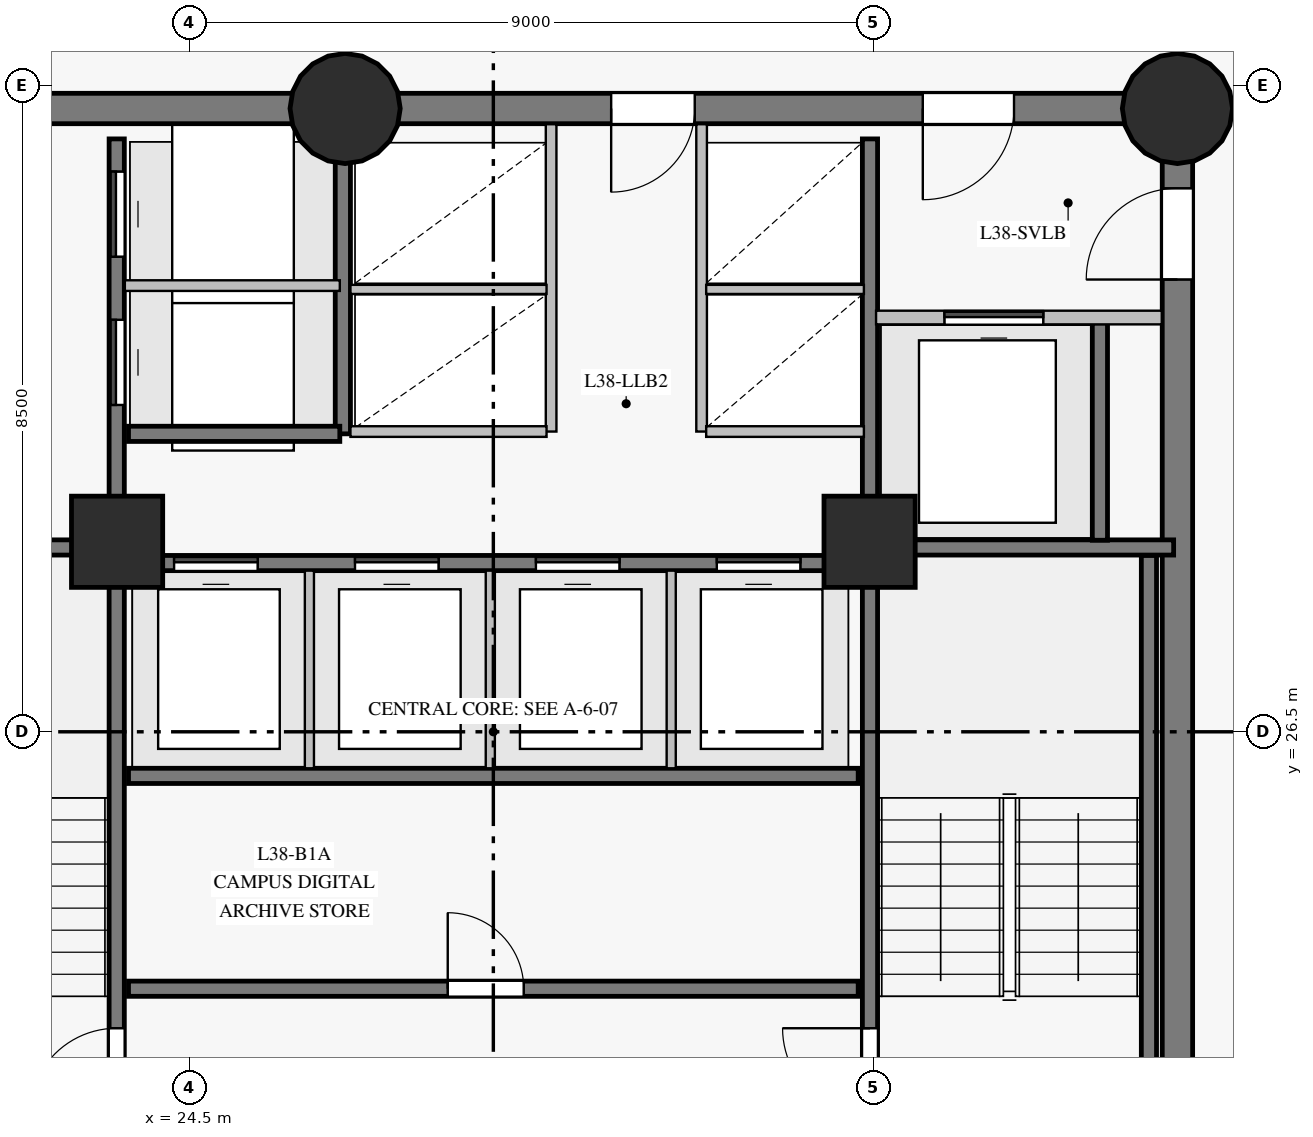
"""IFC4 building model, lengths in metres.
Left out: names, types, materials, properties, quantities, classifications, styles, units other than length and angle.
Written with IfcOpenShell. Run it as: python <this file> out.ifc"""

import sys

from ifc_helpers import new_model, si_unit, direction, frame, frame_2d, origin, origin_with_axes, origin_2d, place, context, subcontext, project, spatial, rectangle, circle, extrude, source, transform, mapped, element, fill, save


model = new_model("IFC4")
c1 = context("Model", 3, precision=1e-05, world=origin(), true_north=direction((0.0, 1.0)))
c2 = subcontext(c1, "Body", "Model", "MODEL_VIEW")
j1 = project(units=[si_unit("LENGTHUNIT", "METRE"), si_unit("PLANEANGLEUNIT", "RADIAN")], contexts=[c1])
p1 = place(None, origin())
s1 = spatial("IfcSite", under=j1, at=p1, CompositionType="ELEMENT")
p2 = place(p1, origin())
s2 = spatial("IfcBuilding", under=s1, at=p2, CompositionType="ELEMENT")
p3 = place(p2, frame((0.0, 0.0, 135.85)))
s3 = spatial("IfcBuildingStorey", under=s2, at=p3, CompositionType="ELEMENT", Elevation=135.85)
p4 = place(p3, frame((37.5, 18.3, 0.0), z_axis=(0.0, 0.0, 1.0), x_axis=(0.0, 1.0, 0.0)))
e1 = element("IfcWall", 1, at=p4, inside=s3, PredefinedType="SHEAR", context=c2, shape_type="SweptSolid", body=[
    extrude(rectangle(XDim=16.4, YDim=0.4, at=frame_2d((8.2, 0.0))), origin(), (0.0, 0.0, 1.0), 2.825),
])
p5 = place(p4, frame((14.15, 0.0, 0.0)))
e2 = element("IfcOpeningElement", 2, at=p5, cuts=e1, PredefinedType="OPENING", context=c2, shape_type="SweptSolid", body=[
    extrude(rectangle(XDim=1.2, YDim=2.15, at=frame_2d((0.6, 1.075))), frame((0.0, 0.21, 0.0), z_axis=(0.0, -1.0, 0.0), x_axis=(1.0, 0.0, 0.0)), (0.0, 0.0, 1.0), 0.42),
])
p6 = place(p3, frame((37.5, 34.7, 0.0), z_axis=(0.0, 0.0, 1.0), x_axis=(-1.0, 0.0, 0.0)))
e3 = element("IfcWall", 3, at=p6, inside=s3, PredefinedType="SHEAR", context=c2, shape_type="SweptSolid", body=[
    extrude(rectangle(XDim=10.95, YDim=0.4, at=frame_2d((5.475, 0.0))), origin(), (0.0, 0.0, 1.0), 2.825),
])
p7 = place(p6, frame((2.15, 0.0, 0.0)))
e4 = element("IfcOpeningElement", 4, at=p7, cuts=e3, PredefinedType="OPENING", context=c2, shape_type="SweptSolid", body=[
    extrude(rectangle(XDim=1.2, YDim=2.15, at=frame_2d((0.6, 1.075))), frame((0.0, 0.21, 0.0), z_axis=(0.0, -1.0, 0.0), x_axis=(1.0, 0.0, 0.0)), (0.0, 0.0, 1.0), 0.42),
])
p8 = place(p6, frame((6.35, 0.0, 0.0)))
e5 = element("IfcOpeningElement", 5, at=p8, cuts=e3, PredefinedType="OPENING", context=c2, shape_type="SweptSolid", body=[
    extrude(rectangle(XDim=1.1, YDim=2.15, at=frame_2d((0.55, 1.075))), frame((0.0, 0.21, 0.0), z_axis=(0.0, -1.0, 0.0), x_axis=(1.0, 0.0, 0.0)), (0.0, 0.0, 1.0), 0.42),
])
p9 = place(p3, frame((26.55, 34.7, 0.0), z_axis=(0.0, 0.0, 1.0), x_axis=(-1.0, 0.0, 0.0)))
e6 = element("IfcWall", 6, at=p9, inside=s3, PredefinedType="SHEAR", context=c2, shape_type="SweptSolid", body=[
    extrude(rectangle(XDim=7.05, YDim=0.4, at=frame_2d((3.525, 0.0))), origin(), (0.0, 0.0, 1.0), 2.825),
])
p10 = place(p9, frame((4.25, 0.0, 0.0)))
e7 = element("IfcOpeningElement", 7, at=p10, cuts=e6, PredefinedType="OPENING", context=c2, shape_type="SweptSolid", body=[
    extrude(rectangle(XDim=1.1, YDim=2.15, at=frame_2d((0.55, 1.075))), frame((0.0, 0.21, 0.0), z_axis=(0.0, -1.0, 0.0), x_axis=(1.0, 0.0, 0.0)), (0.0, 0.0, 1.0), 0.42),
])
m1 = source(origin_with_axes(), c2, "Body", "SweptSolid", [
    extrude(circle(Radius=0.725, at=origin_2d()), origin(), (0.0, 0.0, 1.0), 3.05),
])
for number, where, z_axis, x_axis in (
    (8, (26.55, 34.7, 0.0), (0.0, 0.0, 1.0), (1.0, 0.0, 0.0)),
    (9, (37.5, 34.7, 0.0), (0.0, 0.0, 1.0), (1.0, 0.0, 0.0)),
):
    element("IfcColumn", number, at=place(p3, frame(where, z_axis=z_axis, x_axis=x_axis)), inside=s3, PredefinedType="COLUMN", context=c2, shape_type="MappedRepresentation", body=[
        mapped(m1, transform((0.0, 0.0, 0.0), scale=1.0)),
    ])
m2 = source(origin_with_axes(), c2, "Body", "SweptSolid", [
    extrude(rectangle(XDim=1.2, YDim=1.2, at=origin_2d()), origin(), (0.0, 0.0, 1.0), 3.05),
])
for number, where, z_axis, x_axis in (
    (10, (23.55, 29.0, 0.0), (0.0, 0.0, 1.0), (1.0, 0.0, 0.0)),
    (11, (33.45, 29.0, 0.0), (0.0, 0.0, 1.0), (1.0, 0.0, 0.0)),
):
    element("IfcColumn", number, at=place(p3, frame(where, z_axis=z_axis, x_axis=x_axis)), inside=s3, PredefinedType="COLUMN", context=c2, shape_type="MappedRepresentation", body=[
        mapped(m2, transform((0.0, 0.0, 0.0), scale=1.0)),
    ])
p11 = place(p3, frame((23.545, 18.7, 0.0), z_axis=(0.0, 0.0, 1.0), x_axis=(0.0, 1.0, 0.0)))
e12 = element("IfcWall", 12, at=p11, inside=s3, PredefinedType="SHEAR", context=c2, shape_type="SweptSolid", body=[
    extrude(rectangle(XDim=15.6, YDim=0.2, at=frame_2d((7.8, 0.0))), origin(), (0.0, 0.0, 1.0), 2.825),
])
p12 = place(p11, frame((2.75, 0.0, 0.0)))
e13 = element("IfcOpeningElement", 13, at=p12, cuts=e12, PredefinedType="OPENING", context=c2, shape_type="SweptSolid", body=[
    extrude(rectangle(XDim=1.15, YDim=2.15, at=frame_2d((0.575, 1.075))), frame((0.0, 0.11, 0.0), z_axis=(0.0, -1.0, 0.0), x_axis=(1.0, 0.0, 0.0)), (0.0, 0.0, 1.0), 0.22),
])
p13 = place(p11, frame((0.14, 0.0, 0.0)))
e14 = element("IfcOpeningElement", 14, at=p13, cuts=e12, PredefinedType="OPENING", context=c2, shape_type="SweptSolid", body=[
    extrude(rectangle(XDim=0.88, YDim=2.1, at=frame_2d((0.44, 1.05))), frame((0.0, 0.11, 0.0), z_axis=(0.0, -1.0, 0.0), x_axis=(1.0, 0.0, 0.0)), (0.0, 0.0, 1.0), 0.22),
])
p14 = place(p11, frame((1.36, 0.0, 0.0)))
e15 = element("IfcOpeningElement", 15, at=p14, cuts=e12, PredefinedType="OPENING", context=c2, shape_type="SweptSolid", body=[
    extrude(rectangle(XDim=0.88, YDim=2.1, at=frame_2d((0.44, 1.05))), frame((0.0, 0.11, 0.0), z_axis=(0.0, -1.0, 0.0), x_axis=(1.0, 0.0, 0.0)), (0.0, 0.0, 1.0), 0.22),
])
p15 = place(p11, frame((12.1, 0.0, 0.0)))
e16 = element("IfcOpeningElement", 16, at=p15, cuts=e12, PredefinedType="OPENING", context=c2, shape_type="SweptSolid", body=[
    extrude(rectangle(XDim=1.12, YDim=2.15, at=frame_2d((0.56, 1.075))), frame((0.0, 0.11, 0.0), z_axis=(0.0, -1.0, 0.0), x_axis=(1.0, 0.0, 0.0)), (0.0, 0.0, 1.0), 0.22),
])
p16 = place(p11, frame((14.05, 0.0, 0.0)))
e17 = element("IfcOpeningElement", 17, at=p16, cuts=e12, PredefinedType="OPENING", context=c2, shape_type="SweptSolid", body=[
    extrude(rectangle(XDim=1.12, YDim=2.15, at=frame_2d((0.56, 1.075))), frame((0.0, 0.11, 0.0), z_axis=(0.0, -1.0, 0.0), x_axis=(1.0, 0.0, 0.0)), (0.0, 0.0, 1.0), 0.22),
])
p17 = place(p3, frame((33.455, 18.7, 0.0), z_axis=(0.0, 0.0, 1.0), x_axis=(0.0, 1.0, 0.0)))
e18 = element("IfcWall", 18, at=p17, inside=s3, PredefinedType="SHEAR", context=c2, shape_type="SweptSolid", body=[
    extrude(rectangle(XDim=15.6, YDim=0.2, at=frame_2d((7.8, 0.0))), origin(), (0.0, 0.0, 1.0), 2.825),
])
p18 = place(p17, frame((2.75, 0.0, 0.0)))
e19 = element("IfcOpeningElement", 19, at=p18, cuts=e18, PredefinedType="OPENING", context=c2, shape_type="SweptSolid", body=[
    extrude(rectangle(XDim=1.15, YDim=2.15, at=frame_2d((0.575, 1.075))), frame((0.0, 0.11, 0.0), z_axis=(0.0, -1.0, 0.0), x_axis=(1.0, 0.0, 0.0)), (0.0, 0.0, 1.0), 0.22),
])
p19 = place(p17, frame((0.55, 0.0, 0.0)))
e20 = element("IfcOpeningElement", 20, at=p19, cuts=e18, PredefinedType="OPENING", context=c2, shape_type="SweptSolid", body=[
    extrude(rectangle(XDim=0.94, YDim=2.1, at=frame_2d((0.47, 1.05))), frame((0.0, 0.11, 0.0), z_axis=(0.0, -1.0, 0.0), x_axis=(1.0, 0.0, 0.0)), (0.0, 0.0, 1.0), 0.22),
])
p20 = place(p3, frame((23.7, 23.12, 0.0), z_axis=(0.0, 0.0, 1.0), x_axis=(1.0, 0.0, 0.0)))
e21 = element("IfcWall", 21, at=p20, inside=s3, PredefinedType="SHEAR", context=c2, shape_type="SweptSolid", body=[
    extrude(rectangle(XDim=9.6, YDim=0.2, at=frame_2d((4.8, 0.0))), origin(), (0.0, 0.0, 1.0), 2.825),
])
p21 = place(p20, frame((4.2, 0.0, 0.0)))
e22 = element("IfcOpeningElement", 22, at=p21, cuts=e21, PredefinedType="OPENING", context=c2, shape_type="SweptSolid", body=[
    extrude(rectangle(XDim=1.0, YDim=2.15, at=frame_2d((0.5, 1.075))), frame((0.0, 0.11, 0.0), z_axis=(0.0, -1.0, 0.0), x_axis=(1.0, 0.0, 0.0)), (0.0, 0.0, 1.0), 0.22),
])
p22 = place(p3, frame((23.7, 25.92, 0.0), z_axis=(0.0, 0.0, 1.0), x_axis=(1.0, 0.0, 0.0)))
e23 = element("IfcWall", 23, at=p22, inside=s3, PredefinedType="SHEAR", context=c2, shape_type="SweptSolid", body=[
    extrude(rectangle(XDim=9.6, YDim=0.2, at=frame_2d((4.8, 0.0))), origin(), (0.0, 0.0, 1.0), 2.825),
])
p23 = place(p3, frame((23.7, 28.72, 0.0), z_axis=(0.0, 0.0, 1.0), x_axis=(1.0, 0.0, 0.0)))
e24 = element("IfcWall", 24, at=p23, inside=s3, PredefinedType="SHEAR", context=c2, shape_type="SweptSolid", body=[
    extrude(rectangle(XDim=9.6, YDim=0.2, at=frame_2d((4.8, 0.0))), origin(), (0.0, 0.0, 1.0), 2.825),
])
p24 = place(p23, frame((0.6, 0.0, 0.0)))
e25 = element("IfcOpeningElement", 25, at=p24, cuts=e24, PredefinedType="OPENING", context=c2, shape_type="SweptSolid", body=[
    extrude(rectangle(XDim=1.1, YDim=2.15, at=frame_2d((0.55, 1.075))), frame((0.0, 0.11, 0.0), z_axis=(0.0, -1.0, 0.0), x_axis=(1.0, 0.0, 0.0)), (0.0, 0.0, 1.0), 0.22),
])
p25 = place(p23, frame((2.98, 0.0, 0.0)))
e26 = element("IfcOpeningElement", 26, at=p25, cuts=e24, PredefinedType="OPENING", context=c2, shape_type="SweptSolid", body=[
    extrude(rectangle(XDim=1.1, YDim=2.15, at=frame_2d((0.55, 1.075))), frame((0.0, 0.11, 0.0), z_axis=(0.0, -1.0, 0.0), x_axis=(1.0, 0.0, 0.0)), (0.0, 0.0, 1.0), 0.22),
])
p26 = place(p23, frame((5.36, 0.0, 0.0)))
e27 = element("IfcOpeningElement", 27, at=p26, cuts=e24, PredefinedType="OPENING", context=c2, shape_type="SweptSolid", body=[
    extrude(rectangle(XDim=1.1, YDim=2.15, at=frame_2d((0.55, 1.075))), frame((0.0, 0.11, 0.0), z_axis=(0.0, -1.0, 0.0), x_axis=(1.0, 0.0, 0.0)), (0.0, 0.0, 1.0), 0.22),
])
p27 = place(p23, frame((7.74, 0.0, 0.0)))
e28 = element("IfcOpeningElement", 28, at=p27, cuts=e24, PredefinedType="OPENING", context=c2, shape_type="SweptSolid", body=[
    extrude(rectangle(XDim=1.1, YDim=2.15, at=frame_2d((0.55, 1.075))), frame((0.0, 0.11, 0.0), z_axis=(0.0, -1.0, 0.0), x_axis=(1.0, 0.0, 0.0)), (0.0, 0.0, 1.0), 0.22),
])
p28 = place(p3, frame((37.125, 21.32, 0.0), z_axis=(0.0, 0.0, 1.0), x_axis=(0.0, 1.0, 0.0)))
e29 = element("IfcWall", 29, at=p28, inside=s3, PredefinedType="SHEAR", context=c2, shape_type="SweptSolid", body=[
    extrude(rectangle(XDim=7.5, YDim=0.2, at=frame_2d((3.75, 0.0))), origin(), (0.0, 0.0, 1.0), 2.825),
])
for number, where, z_axis, x_axis in (
    (30, (33.455, 28.925, 0.0), (0.0, 0.0, 1.0), (1.0, 0.0, 0.0)),
    (31, (19.55, 28.925, 0.0), (0.0, 0.0, 1.0), (1.0, 0.0, 0.0)),
):
    element("IfcWall", number, at=place(p3, frame(where, z_axis=z_axis, x_axis=x_axis)), inside=s3, PredefinedType="SHEAR", context=c2, shape_type="SweptSolid", body=[
        extrude(rectangle(XDim=3.995, YDim=0.2, at=frame_2d((1.998, 0.0))), origin(), (0.0, 0.0, 1.0), 2.825),
    ])
p29 = place(p3, frame((26.52, 30.42, 0.0), z_axis=(0.0, 0.0, 1.0), x_axis=(0.0, 1.0, 0.0)))
e32 = element("IfcWall", 32, at=p29, inside=s3, PredefinedType="SHEAR", context=c2, shape_type="SweptSolid", body=[
    extrude(rectangle(XDim=3.86, YDim=0.2, at=frame_2d((1.93, 0.0))), origin(), (0.0, 0.0, 1.0), 2.825),
])
p30 = place(p3, frame((36.48, 29.02, 0.0), z_axis=(0.0, 0.0, 1.0), x_axis=(0.0, 1.0, 0.0)))
e33 = element("IfcWall", 33, at=p30, inside=s3, PredefinedType="SHEAR", context=c2, shape_type="SweptSolid", body=[
    extrude(rectangle(XDim=2.86, YDim=0.2, at=frame_2d((1.43, 0.0))), origin(), (0.0, 0.0, 1.0), 2.825),
])
p31 = place(p3, frame((23.7, 30.42, 0.0), z_axis=(0.0, 0.0, 1.0), x_axis=(1.0, 0.0, 0.0)))
e34 = element("IfcWall", 34, at=p31, inside=s3, PredefinedType="SHEAR", context=c2, shape_type="SweptSolid", body=[
    extrude(rectangle(XDim=2.78, YDim=0.2, at=frame_2d((1.39, 0.0))), origin(), (0.0, 0.0, 1.0), 2.825),
])
for number, where, z_axis, x_axis in (
    (35, (29.26, 30.45, 0.0), (0.0, 0.0, 1.0), (0.0, 1.0, 0.0)),
    (36, (31.24, 30.45, 0.0), (0.0, 0.0, 1.0), (0.0, 1.0, 0.0)),
):
    element("IfcWall", number, at=place(p3, frame(where, z_axis=z_axis, x_axis=x_axis)), inside=s3, PredefinedType="PARTITIONING", context=c2, shape_type="SweptSolid", body=[
        extrude(rectangle(XDim=4.043, YDim=0.14, at=frame_2d((2.021, 0.0))), origin(), (0.0, 0.0, 1.0), 2.825),
    ])
p32 = place(p3, frame((33.535, 31.95, 0.0), z_axis=(0.0, 0.0, 1.0), x_axis=(1.0, 0.0, 0.0)))
e37 = element("IfcWall", 37, at=p32, inside=s3, PredefinedType="PARTITIONING", context=c2, shape_type="SweptSolid", body=[
    extrude(rectangle(XDim=3.759, YDim=0.18, at=frame_2d((1.879, 0.0))), origin(), (0.0, 0.0, 1.0), 2.825),
])
p33 = place(p32, frame((0.9, 0.0, 0.0)))
e38 = element("IfcOpeningElement", 38, at=p33, cuts=e37, PredefinedType="OPENING", context=c2, shape_type="SweptSolid", body=[
    extrude(rectangle(XDim=1.3, YDim=2.2, at=frame_2d((0.65, 1.1))), frame((0.0, 0.1, 0.0), z_axis=(0.0, -1.0, 0.0), x_axis=(1.0, 0.0, 0.0)), (0.0, 0.0, 1.0), 0.2),
])
p34 = place(p3, frame((23.652, 32.37, 0.0), z_axis=(0.0, 0.0, 1.0), x_axis=(1.0, 0.0, 0.0)))
e39 = element("IfcWall", 39, at=p34, inside=s3, PredefinedType="PARTITIONING", context=c2, shape_type="SweptSolid", body=[
    extrude(rectangle(XDim=2.828, YDim=0.14, at=frame_2d((1.414, 0.0))), origin(), (0.0, 0.0, 1.0), 2.825),
])
for number, where, z_axis, x_axis in (
    (40, (26.08, 26.02, 0.0), (0.0, 0.0, 1.0), (0.0, 1.0, 0.0)),
    (41, (28.46, 26.02, 0.0), (0.0, 0.0, 1.0), (0.0, 1.0, 0.0)),
    (42, (30.84, 26.02, 0.0), (0.0, 0.0, 1.0), (0.0, 1.0, 0.0)),
):
    element("IfcWall", number, at=place(p3, frame(where, z_axis=z_axis, x_axis=x_axis)), inside=s3, PredefinedType="PARTITIONING", context=c2, shape_type="SweptSolid", body=[
        extrude(rectangle(XDim=2.6, YDim=0.12, at=frame_2d((1.3, 0.0))), origin(), (0.0, 0.0, 1.0), 2.825),
    ])
p35 = place(p3, frame((26.62, 30.45, 0.0), z_axis=(0.0, 0.0, 1.0), x_axis=(1.0, 0.0, 0.0)))
e43 = element("IfcWall", 43, at=p35, inside=s3, PredefinedType="PARTITIONING", context=c2, shape_type="SweptSolid", body=[
    extrude(rectangle(XDim=2.58, YDim=0.14, at=frame_2d((1.29, 0.0))), origin(), (0.0, 0.0, 1.0), 2.825),
])
p36 = place(p3, frame((26.62, 32.32, 0.0), z_axis=(0.0, 0.0, 1.0), x_axis=(1.0, 0.0, 0.0)))
e44 = element("IfcWall", 44, at=p36, inside=s3, PredefinedType="PARTITIONING", context=c2, shape_type="SweptSolid", body=[
    extrude(rectangle(XDim=2.58, YDim=0.12, at=frame_2d((1.29, 0.0))), origin(), (0.0, 0.0, 1.0), 2.825),
])
p37 = place(p3, frame((31.3, 30.45, 0.0), z_axis=(0.0, 0.0, 1.0), x_axis=(1.0, 0.0, 0.0)))
e45 = element("IfcWall", 45, at=p37, inside=s3, PredefinedType="PARTITIONING", context=c2, shape_type="SweptSolid", body=[
    extrude(rectangle(XDim=2.075, YDim=0.14, at=frame_2d((1.038, 0.0))), origin(), (0.0, 0.0, 1.0), 2.825),
])
p38 = place(p3, frame((31.3, 32.32, 0.0), z_axis=(0.0, 0.0, 1.0), x_axis=(1.0, 0.0, 0.0)))
e46 = element("IfcWall", 46, at=p38, inside=s3, PredefinedType="PARTITIONING", context=c2, shape_type="SweptSolid", body=[
    extrude(rectangle(XDim=2.075, YDim=0.12, at=frame_2d((1.038, 0.0))), origin(), (0.0, 0.0, 1.0), 2.825),
])
m3 = source(origin_with_axes(), c2, "Body", "SweptSolid", [
    extrude(rectangle(XDim=1.15, YDim=2.15, at=frame_2d((0.575, 1.075))), frame((0.0, 0.025, 0.0), z_axis=(0.0, -1.0, 0.0), x_axis=(1.0, 0.0, 0.0)), (0.0, 0.0, 1.0), 0.05),
])
p39 = place(p12, origin())
e47 = element("IfcDoor", 47, at=p39, inside=s3, OperationType="SINGLE_SWING_LEFT", PredefinedType="DOOR", context=c2, shape_type="MappedRepresentation", body=[
    mapped(m3, transform((0.0, 0.0, 0.0), scale=1.0)),
])
fill(e13, e47)
p40 = place(p18, origin())
e48 = element("IfcDoor", 48, at=p40, inside=s3, OperationType="SINGLE_SWING_RIGHT", PredefinedType="DOOR", context=c2, shape_type="MappedRepresentation", body=[
    mapped(m3, transform((0.0, 0.0, 0.0), scale=1.0)),
])
fill(e19, e48)
m4 = source(origin_with_axes(), c2, "Body", "SweptSolid", [
    extrude(rectangle(XDim=1.2, YDim=2.15, at=frame_2d((0.6, 1.075))), frame((0.0, 0.025, 0.0), z_axis=(0.0, -1.0, 0.0), x_axis=(1.0, 0.0, 0.0)), (0.0, 0.0, 1.0), 0.05),
])
p41 = place(p5, origin())
e49 = element("IfcDoor", 49, at=p41, inside=s3, OperationType="SINGLE_SWING_LEFT", PredefinedType="DOOR", context=c2, shape_type="MappedRepresentation", body=[
    mapped(m4, transform((0.0, 0.0, 0.0), scale=1.0)),
])
fill(e2, e49)
p42 = place(p7, origin())
e50 = element("IfcDoor", 50, at=p42, inside=s3, OperationType="SINGLE_SWING_RIGHT", PredefinedType="DOOR", context=c2, shape_type="MappedRepresentation", body=[
    mapped(m4, transform((0.0, 0.0, 0.0), scale=1.0)),
])
fill(e4, e50)
m5 = source(origin_with_axes(), c2, "Body", "SweptSolid", [
    extrude(rectangle(XDim=1.3, YDim=2.2, at=frame_2d((0.65, 1.1))), frame((0.0, 0.025, 0.0), z_axis=(0.0, -1.0, 0.0), x_axis=(1.0, 0.0, 0.0)), (0.0, 0.0, 1.0), 0.05),
])
p43 = place(p33, origin())
e51 = element("IfcDoor", 51, at=p43, inside=s3, OperationType="SLIDING_TO_LEFT", PredefinedType="DOOR", context=c2, shape_type="MappedRepresentation", body=[
    mapped(m5, transform((0.0, 0.0, 0.0), scale=1.0)),
])
fill(e38, e51)
m6 = source(origin_with_axes(), c2, "Body", "SweptSolid", [
    extrude(rectangle(XDim=1.0, YDim=2.15, at=frame_2d((0.5, 1.075))), frame((0.0, 0.025, 0.0), z_axis=(0.0, -1.0, 0.0), x_axis=(1.0, 0.0, 0.0)), (0.0, 0.0, 1.0), 0.05),
])
p44 = place(p21, origin())
e52 = element("IfcDoor", 52, at=p44, inside=s3, OperationType="SINGLE_SWING_LEFT", PredefinedType="DOOR", context=c2, shape_type="MappedRepresentation", body=[
    mapped(m6, transform((0.0, 0.0, 0.0), scale=1.0)),
])
fill(e22, e52)
m7 = source(origin_with_axes(), c2, "Body", "SweptSolid", [
    extrude(rectangle(XDim=1.1, YDim=2.15, at=frame_2d((0.55, 1.075))), frame((0.0, 0.025, 0.0), z_axis=(0.0, -1.0, 0.0), x_axis=(1.0, 0.0, 0.0)), (0.0, 0.0, 1.0), 0.05),
])
p45 = place(p24, origin())
e53 = element("IfcDoor", 53, at=p45, inside=s3, OperationType="SLIDING_TO_LEFT", PredefinedType="DOOR", context=c2, shape_type="MappedRepresentation", body=[
    mapped(m7, transform((0.0, 0.0, 0.0), scale=1.0)),
])
fill(e25, e53)
p46 = place(p25, origin())
e54 = element("IfcDoor", 54, at=p46, inside=s3, OperationType="SLIDING_TO_RIGHT", PredefinedType="DOOR", context=c2, shape_type="MappedRepresentation", body=[
    mapped(m7, transform((0.0, 0.0, 0.0), scale=1.0)),
])
fill(e26, e54)
p47 = place(p26, origin())
e55 = element("IfcDoor", 55, at=p47, inside=s3, OperationType="SLIDING_TO_LEFT", PredefinedType="DOOR", context=c2, shape_type="MappedRepresentation", body=[
    mapped(m7, transform((0.0, 0.0, 0.0), scale=1.0)),
])
fill(e27, e55)
p48 = place(p27, origin())
e56 = element("IfcDoor", 56, at=p48, inside=s3, OperationType="SLIDING_TO_RIGHT", PredefinedType="DOOR", context=c2, shape_type="MappedRepresentation", body=[
    mapped(m7, transform((0.0, 0.0, 0.0), scale=1.0)),
])
fill(e28, e56)
p49 = place(p8, origin())
e57 = element("IfcDoor", 57, at=p49, inside=s3, OperationType="SINGLE_SWING_RIGHT", PredefinedType="DOOR", context=c2, shape_type="MappedRepresentation", body=[
    mapped(m7, transform((0.0, 0.0, 0.0), scale=1.0)),
])
fill(e5, e57)
m8 = source(origin_with_axes(), c2, "Body", "SweptSolid", [
    extrude(rectangle(XDim=1.12, YDim=2.15, at=frame_2d((0.56, 1.075))), frame((0.0, 0.025, 0.0), z_axis=(0.0, -1.0, 0.0), x_axis=(1.0, 0.0, 0.0)), (0.0, 0.0, 1.0), 0.05),
])
p50 = place(p15, origin())
e58 = element("IfcDoor", 58, at=p50, inside=s3, OperationType="SLIDING_TO_LEFT", PredefinedType="DOOR", context=c2, shape_type="MappedRepresentation", body=[
    mapped(m8, transform((0.0, 0.0, 0.0), scale=1.0)),
])
fill(e16, e58)
p51 = place(p16, origin())
e59 = element("IfcDoor", 59, at=p51, inside=s3, OperationType="SLIDING_TO_RIGHT", PredefinedType="DOOR", context=c2, shape_type="MappedRepresentation", body=[
    mapped(m8, transform((0.0, 0.0, 0.0), scale=1.0)),
])
fill(e17, e59)
save(model, sys.argv[1])
